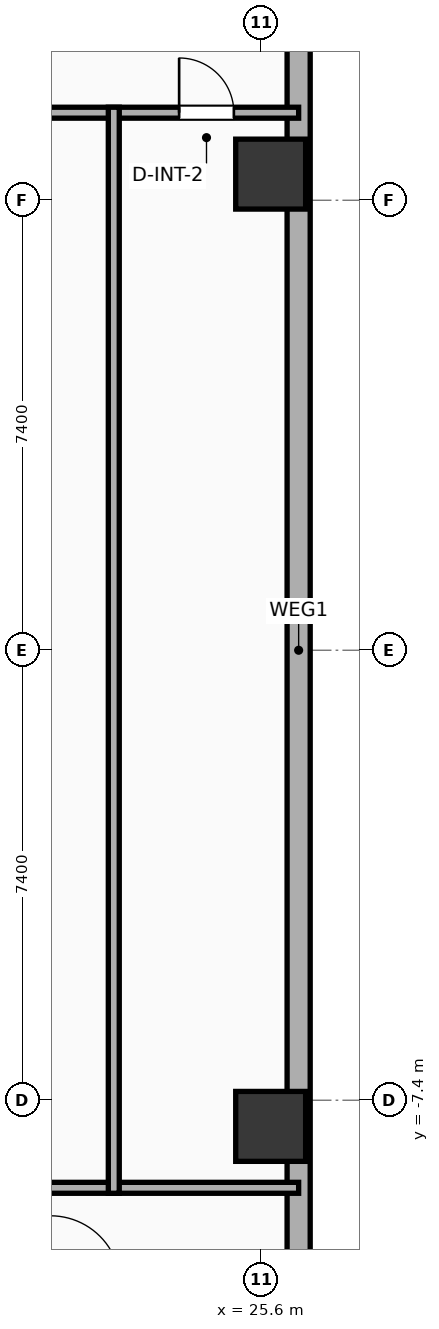
"""IFC4 building model, lengths in metres.
Left out: names, types, materials, properties, quantities, classifications, styles, units other than length and angle.
Written with IfcOpenShell. Run it as: python <this file> out.ifc"""

import sys

from ifc_helpers import new_model, si_unit, direction, frame, frame_2d, origin, origin_2d, place, context, subcontext, project, spatial, rectangle, hollow_rectangle, extrude, element, fill, save


model = new_model("IFC4")
c1 = context("Model", 3, precision=1e-05, world=origin(), true_north=direction((0.0, 1.0)))
c2 = subcontext(c1, "Body", "Model", "MODEL_VIEW")
j1 = project(units=[si_unit("LENGTHUNIT", "METRE"), si_unit("PLANEANGLEUNIT", "RADIAN")], contexts=[c1])
p1 = place(None, origin())
s1 = spatial("IfcSite", under=j1, at=p1, CompositionType="ELEMENT")
p2 = place(p1, origin())
s2 = spatial("IfcBuilding", under=s1, at=p2, CompositionType="ELEMENT")
p3 = place(p2, frame((0.0, 0.0, 72.8)))
s3 = spatial("IfcBuildingStorey", under=s2, at=p3, CompositionType="ELEMENT", Elevation=72.8)
for number, where, z_axis, x_axis in (
    (1, (25.75, -7.83, 0.0), (0.0, 0.0, 1.0), (1.0, 0.0, 0.0)),
    (2, (25.75, 7.83, 0.0), (0.0, 0.0, 1.0), (1.0, 0.0, 0.0)),
):
    element("IfcColumn", number, at=place(p3, frame(where, z_axis=z_axis, x_axis=x_axis)), inside=s3, PredefinedType="COLUMN", context=c2, shape_type="SweptSolid", body=[
        extrude(hollow_rectangle(XDim=1.15, YDim=1.15, WallThickness=0.04, at=origin_2d()), origin(), (0.0, 0.0, 1.0), 3.9),
    ])
p4 = place(p3, frame((26.21, 18.381, 0.0), z_axis=(0.0, 0.0, 1.0), x_axis=(0.0, -1.0, 0.0)))
e3 = element("IfcWall", 3, at=p4, inside=s3, PredefinedType="ELEMENTEDWALL", context=c2, shape_type="SweptSolid", body=[
    extrude(rectangle(XDim=36.763, YDim=0.38, at=frame_2d((18.381, 0.0))), origin(), (0.0, 0.0, 1.0), 3.65),
])
p5 = place(p4, frame((33.362, 0.0, 0.75)))
e4 = element("IfcOpeningElement", 4, at=p5, cuts=e3, PredefinedType="OPENING", context=c2, shape_type="SweptSolid", body=[
    extrude(rectangle(XDim=1.2, YDim=2.05, at=frame_2d((0.6, 1.025))), frame((0.0, 0.2, 0.0), z_axis=(0.0, -1.0, 0.0), x_axis=(1.0, 0.0, 0.0)), (0.0, 0.0, 1.0), 0.4),
])
p6 = place(p3, frame((9.88, 8.84, 0.0), z_axis=(0.0, 0.0, 1.0), x_axis=(1.0, 0.0, 0.0)))
e5 = element("IfcWall", 5, at=p6, inside=s3, PredefinedType="PARTITIONING", context=c2, shape_type="SweptSolid", body=[
    extrude(rectangle(XDim=16.33, YDim=0.18, at=frame_2d((8.165, 0.0))), origin(), (0.0, 0.0, 1.0), 3.65),
])
p7 = place(p6, frame((14.365, 0.0, 0.0)))
e6 = element("IfcOpeningElement", 6, at=p7, cuts=e5, PredefinedType="OPENING", context=c2, shape_type="SweptSolid", body=[
    extrude(rectangle(XDim=0.9, YDim=2.05, at=frame_2d((0.45, 1.025))), frame((0.0, 0.1, 0.0), z_axis=(0.0, -1.0, 0.0), x_axis=(1.0, 0.0, 0.0)), (0.0, 0.0, 1.0), 0.2),
])
p8 = place(p3, frame((9.88, -8.84, 0.0), z_axis=(0.0, 0.0, 1.0), x_axis=(1.0, 0.0, 0.0)))
e7 = element("IfcWall", 7, at=p8, inside=s3, PredefinedType="PARTITIONING", context=c2, shape_type="SweptSolid", body=[
    extrude(rectangle(XDim=16.33, YDim=0.18, at=frame_2d((8.165, 0.0))), origin(), (0.0, 0.0, 1.0), 3.65),
])
p9 = place(p3, frame((23.17, -8.93, 0.0), z_axis=(0.0, 0.0, 1.0), x_axis=(0.0, 1.0, 0.0)))
e8 = element("IfcWall", 8, at=p9, inside=s3, PredefinedType="PARTITIONING", context=c2, shape_type="SweptSolid", body=[
    extrude(rectangle(XDim=17.86, YDim=0.18, at=frame_2d((8.93, 0.0))), origin(), (0.0, 0.0, 1.0), 3.65),
])
p10 = place(p7, origin())
e9 = element("IfcDoor", 9, at=p10, inside=s3, OperationType="SINGLE_SWING_LEFT", PredefinedType="DOOR", context=c2, shape_type="SweptSolid", body=[
    extrude(rectangle(XDim=0.9, YDim=2.05, at=frame_2d((0.45, 1.025))), frame((0.0, 0.025, 0.0), z_axis=(0.0, -1.0, 0.0), x_axis=(1.0, 0.0, 0.0)), (0.0, 0.0, 1.0), 0.05),
])
fill(e6, e9)
save(model, sys.argv[1])
